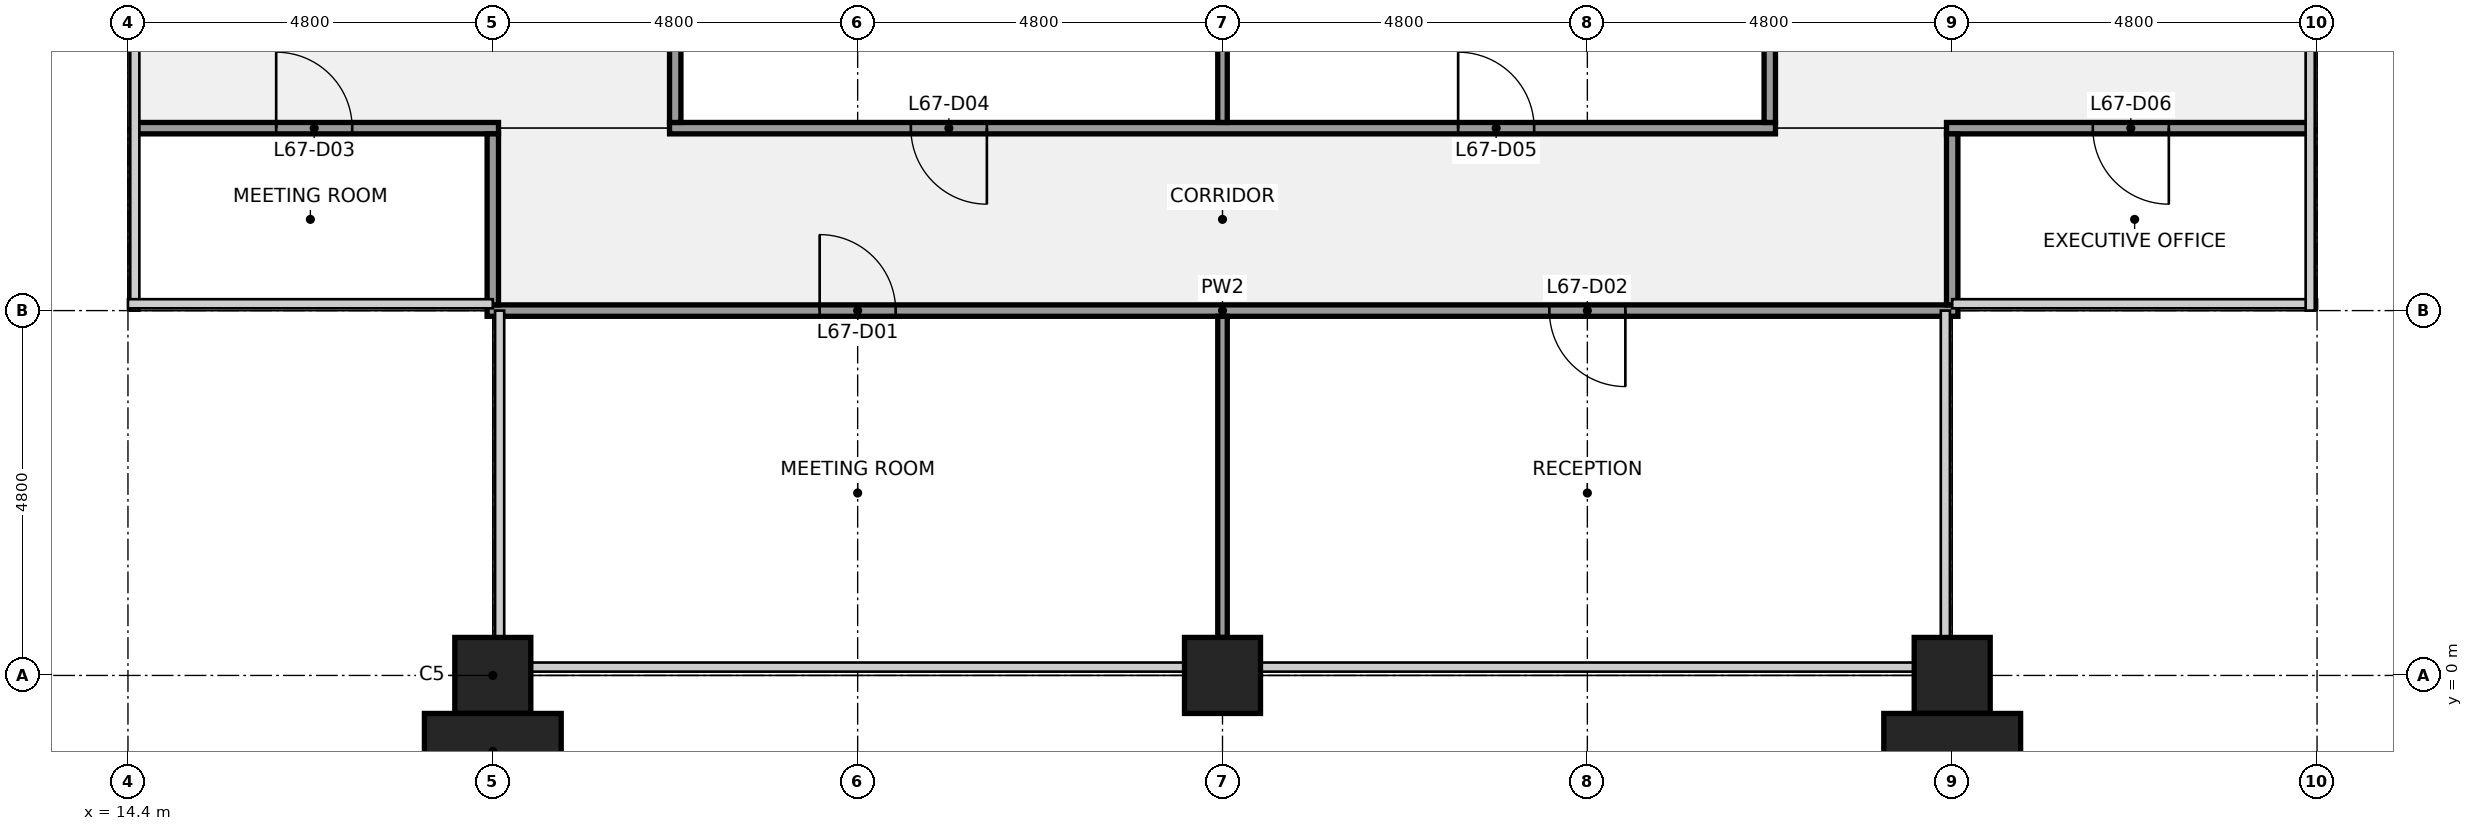
"""IFC4 building model, lengths in metres.
Left out: names, types, materials, properties, quantities, classifications, styles, units other than length and angle.
Written with IfcOpenShell. Run it as: python <this file> out.ifc"""

import sys

from ifc_helpers import new_model, si_unit, direction, frame, frame_2d, origin, origin_2d, place, context, subcontext, project, spatial, rectangle, extrude, element, fill, save


model = new_model("IFC4")
c1 = context("Model", 3, precision=1e-05, world=origin(), true_north=direction((0.0, 1.0)))
c2 = subcontext(c1, "Body", "Model", "MODEL_VIEW")
j1 = project(units=[si_unit("LENGTHUNIT", "METRE"), si_unit("PLANEANGLEUNIT", "RADIAN")], contexts=[c1])
p1 = place(None, origin())
s1 = spatial("IfcSite", under=j1, at=p1, CompositionType="ELEMENT")
p2 = place(p1, origin())
s2 = spatial("IfcBuilding", under=s1, at=p2, CompositionType="ELEMENT")
p3 = place(p2, frame((0.0, 0.0, 306.3)))
s3 = spatial("IfcBuildingStorey", under=s2, at=p3, CompositionType="ELEMENT", Elevation=306.3)
for number, where, z_axis, x_axis in (
    (1, (19.2, 0.0, 0.0), (0.0, 0.0, 1.0), (1.0, 0.0, 0.0)),
    (2, (28.8, 0.0, 0.0), (0.0, 0.0, 1.0), (1.0, 0.0, 0.0)),
    (3, (38.4, 0.0, 0.0), (0.0, 0.0, 1.0), (1.0, 0.0, 0.0)),
):
    element("IfcColumn", number, at=place(p3, frame(where, z_axis=z_axis, x_axis=x_axis)), inside=s3, PredefinedType="COLUMN", context=c2, shape_type="SweptSolid", body=[
        extrude(rectangle(XDim=1.0, YDim=1.0, at=origin_2d()), origin(), (0.0, 0.0, 1.0), 4.0),
    ])
p4 = place(p3, frame((19.125, 4.8, 0.0), z_axis=(0.0, 0.0, 1.0), x_axis=(1.0, 0.0, 0.0)))
e4 = element("IfcWall", 4, at=p4, inside=s3, PredefinedType="PARTITIONING", context=c2, shape_type="SweptSolid", body=[
    extrude(rectangle(XDim=19.35, YDim=0.15, at=frame_2d((9.675, 0.0))), origin(), (0.0, 0.0, 1.0), 2.87),
])
p5 = place(p4, frame((4.375, 0.0, 0.0)))
e5 = element("IfcOpeningElement", 5, at=p5, cuts=e4, PredefinedType="OPENING", context=c2, shape_type="SweptSolid", body=[
    extrude(rectangle(XDim=1.0, YDim=2.1, at=frame_2d((0.5, 1.05))), frame((0.0, 0.085, 0.0), z_axis=(0.0, -1.0, 0.0), x_axis=(1.0, 0.0, 0.0)), (0.0, 0.0, 1.0), 0.17),
])
p6 = place(p4, frame((13.975, 0.0, 0.0)))
e6 = element("IfcOpeningElement", 6, at=p6, cuts=e4, PredefinedType="OPENING", context=c2, shape_type="SweptSolid", body=[
    extrude(rectangle(XDim=1.0, YDim=2.1, at=frame_2d((0.5, 1.05))), frame((0.0, 0.085, 0.0), z_axis=(0.0, -1.0, 0.0), x_axis=(1.0, 0.0, 0.0)), (0.0, 0.0, 1.0), 0.17),
])
p7 = place(p3, frame((14.5, 7.2, 0.0), z_axis=(0.0, 0.0, 1.0), x_axis=(1.0, 0.0, 0.0)))
e7 = element("IfcWall", 7, at=p7, inside=s3, PredefinedType="PARTITIONING", context=c2, shape_type="SweptSolid", body=[
    extrude(rectangle(XDim=4.775, YDim=0.15, at=frame_2d((2.387, 0.0))), origin(), (0.0, 0.0, 1.0), 2.87),
])
p8 = place(p7, frame((1.85, 0.0, 0.0)))
e8 = element("IfcOpeningElement", 8, at=p8, cuts=e7, PredefinedType="OPENING", context=c2, shape_type="SweptSolid", body=[
    extrude(rectangle(XDim=1.0, YDim=2.1, at=frame_2d((0.5, 1.05))), frame((0.0, 0.085, 0.0), z_axis=(0.0, -1.0, 0.0), x_axis=(1.0, 0.0, 0.0)), (0.0, 0.0, 1.0), 0.17),
])
p9 = place(p3, frame((21.525, 7.2, 0.0), z_axis=(0.0, 0.0, 1.0), x_axis=(1.0, 0.0, 0.0)))
e9 = element("IfcWall", 9, at=p9, inside=s3, PredefinedType="PARTITIONING", context=c2, shape_type="SweptSolid", body=[
    extrude(rectangle(XDim=14.55, YDim=0.15, at=frame_2d((7.275, 0.0))), origin(), (0.0, 0.0, 1.0), 2.87),
])
p10 = place(p9, frame((3.175, 0.0, 0.0)))
e10 = element("IfcOpeningElement", 10, at=p10, cuts=e9, PredefinedType="OPENING", context=c2, shape_type="SweptSolid", body=[
    extrude(rectangle(XDim=1.0, YDim=2.1, at=frame_2d((0.5, 1.05))), frame((0.0, 0.085, 0.0), z_axis=(0.0, -1.0, 0.0), x_axis=(1.0, 0.0, 0.0)), (0.0, 0.0, 1.0), 0.17),
])
p11 = place(p9, frame((10.375, 0.0, 0.0)))
e11 = element("IfcOpeningElement", 11, at=p11, cuts=e9, PredefinedType="OPENING", context=c2, shape_type="SweptSolid", body=[
    extrude(rectangle(XDim=1.0, YDim=2.1, at=frame_2d((0.5, 1.05))), frame((0.0, 0.085, 0.0), z_axis=(0.0, -1.0, 0.0), x_axis=(1.0, 0.0, 0.0)), (0.0, 0.0, 1.0), 0.17),
])
p12 = place(p3, frame((38.325, 7.2, 0.0), z_axis=(0.0, 0.0, 1.0), x_axis=(1.0, 0.0, 0.0)))
e12 = element("IfcWall", 12, at=p12, inside=s3, PredefinedType="PARTITIONING", context=c2, shape_type="SweptSolid", body=[
    extrude(rectangle(XDim=4.775, YDim=0.15, at=frame_2d((2.388, 0.0))), origin(), (0.0, 0.0, 1.0), 2.87),
])
p13 = place(p12, frame((1.925, 0.0, 0.0)))
e13 = element("IfcOpeningElement", 13, at=p13, cuts=e12, PredefinedType="OPENING", context=c2, shape_type="SweptSolid", body=[
    extrude(rectangle(XDim=1.0, YDim=2.1, at=frame_2d((0.5, 1.05))), frame((0.0, 0.085, 0.0), z_axis=(0.0, -1.0, 0.0), x_axis=(1.0, 0.0, 0.0)), (0.0, 0.0, 1.0), 0.17),
])
p14 = place(p3, frame((19.2, 4.875, 0.0), z_axis=(0.0, 0.0, 1.0), x_axis=(0.0, 1.0, 0.0)))
e14 = element("IfcWall", 14, at=p14, inside=s3, PredefinedType="PARTITIONING", context=c2, shape_type="SweptSolid", body=[
    extrude(rectangle(XDim=2.25, YDim=0.15, at=frame_2d((1.125, 0.0))), origin(), (0.0, 0.0, 1.0), 2.87),
])
p15 = place(p3, frame((21.6, 7.275, 0.0), z_axis=(0.0, 0.0, 1.0), x_axis=(0.0, 1.0, 0.0)))
e15 = element("IfcWall", 15, at=p15, inside=s3, PredefinedType="PARTITIONING", context=c2, shape_type="SweptSolid", body=[
    extrude(rectangle(XDim=3.463, YDim=0.15, at=frame_2d((1.731, 0.0))), origin(), (0.0, 0.0, 1.0), 2.87),
])
p16 = place(p3, frame((28.8, 0.5, 0.0), z_axis=(0.0, 0.0, 1.0), x_axis=(0.0, 1.0, 0.0)))
e16 = element("IfcWall", 16, at=p16, inside=s3, PredefinedType="PARTITIONING", context=c2, shape_type="SweptSolid", body=[
    extrude(rectangle(XDim=4.225, YDim=0.125, at=frame_2d((2.113, 0.0))), origin(), (0.0, 0.0, 1.0), 2.87),
])
p17 = place(p3, frame((28.8, 7.275, 0.0), z_axis=(0.0, 0.0, 1.0), x_axis=(0.0, 1.0, 0.0)))
e17 = element("IfcWall", 17, at=p17, inside=s3, PredefinedType="PARTITIONING", context=c2, shape_type="SweptSolid", body=[
    extrude(rectangle(XDim=3.463, YDim=0.125, at=frame_2d((1.731, 0.0))), origin(), (0.0, 0.0, 1.0), 2.87),
])
p18 = place(p3, frame((36.0, 7.275, 0.0), z_axis=(0.0, 0.0, 1.0), x_axis=(0.0, 1.0, 0.0)))
e18 = element("IfcWall", 18, at=p18, inside=s3, PredefinedType="PARTITIONING", context=c2, shape_type="SweptSolid", body=[
    extrude(rectangle(XDim=3.463, YDim=0.15, at=frame_2d((1.731, 0.0))), origin(), (0.0, 0.0, 1.0), 2.87),
])
p19 = place(p3, frame((38.4, 4.875, 0.0), z_axis=(0.0, 0.0, 1.0), x_axis=(0.0, 1.0, 0.0)))
e19 = element("IfcWall", 19, at=p19, inside=s3, PredefinedType="PARTITIONING", context=c2, shape_type="SweptSolid", body=[
    extrude(rectangle(XDim=2.25, YDim=0.15, at=frame_2d((1.125, 0.0))), origin(), (0.0, 0.0, 1.0), 2.87),
])
for number, where, z_axis, x_axis in (
    (20, (19.2, -1.0, 0.0), (0.0, 0.0, 1.0), (1.0, 0.0, 0.0)),
    (21, (38.4, -1.0, 0.0), (0.0, 0.0, 1.0), (1.0, 0.0, 0.0)),
):
    element("IfcColumn", number, at=place(p3, frame(where, z_axis=z_axis, x_axis=x_axis)), inside=s3, PredefinedType="PILASTER", context=c2, shape_type="SweptSolid", body=[
        extrude(rectangle(XDim=1.8, YDim=1.0, at=origin_2d()), origin(), (0.0, 0.0, 1.0), 4.0),
    ])
p20 = place(p5, origin())
e22 = element("IfcDoor", 22, at=p20, inside=s3, OperationType="SINGLE_SWING_LEFT", PredefinedType="DOOR", context=c2, shape_type="SweptSolid", body=[
    extrude(rectangle(XDim=1.0, YDim=2.1, at=frame_2d((0.5, 1.05))), frame((0.0, 0.025, 0.0), z_axis=(0.0, -1.0, 0.0), x_axis=(1.0, 0.0, 0.0)), (0.0, 0.0, 1.0), 0.05),
])
fill(e5, e22)
p21 = place(p6, origin())
e23 = element("IfcDoor", 23, at=p21, inside=s3, OperationType="SINGLE_SWING_RIGHT", PredefinedType="DOOR", context=c2, shape_type="SweptSolid", body=[
    extrude(rectangle(XDim=1.0, YDim=2.1, at=frame_2d((0.5, 1.05))), frame((0.0, 0.025, 0.0), z_axis=(0.0, -1.0, 0.0), x_axis=(1.0, 0.0, 0.0)), (0.0, 0.0, 1.0), 0.05),
])
fill(e6, e23)
p22 = place(p8, origin())
e24 = element("IfcDoor", 24, at=p22, inside=s3, OperationType="SINGLE_SWING_LEFT", PredefinedType="DOOR", context=c2, shape_type="SweptSolid", body=[
    extrude(rectangle(XDim=1.0, YDim=2.1, at=frame_2d((0.5, 1.05))), frame((0.0, 0.025, 0.0), z_axis=(0.0, -1.0, 0.0), x_axis=(1.0, 0.0, 0.0)), (0.0, 0.0, 1.0), 0.05),
])
fill(e8, e24)
p23 = place(p10, origin())
e25 = element("IfcDoor", 25, at=p23, inside=s3, OperationType="SINGLE_SWING_RIGHT", PredefinedType="DOOR", context=c2, shape_type="SweptSolid", body=[
    extrude(rectangle(XDim=1.0, YDim=2.1, at=frame_2d((0.5, 1.05))), frame((0.0, 0.025, 0.0), z_axis=(0.0, -1.0, 0.0), x_axis=(1.0, 0.0, 0.0)), (0.0, 0.0, 1.0), 0.05),
])
fill(e10, e25)
p24 = place(p11, origin())
e26 = element("IfcDoor", 26, at=p24, inside=s3, OperationType="SINGLE_SWING_LEFT", PredefinedType="DOOR", context=c2, shape_type="SweptSolid", body=[
    extrude(rectangle(XDim=1.0, YDim=2.1, at=frame_2d((0.5, 1.05))), frame((0.0, 0.025, 0.0), z_axis=(0.0, -1.0, 0.0), x_axis=(1.0, 0.0, 0.0)), (0.0, 0.0, 1.0), 0.05),
])
fill(e11, e26)
p25 = place(p13, origin())
e27 = element("IfcDoor", 27, at=p25, inside=s3, OperationType="SINGLE_SWING_RIGHT", PredefinedType="DOOR", context=c2, shape_type="SweptSolid", body=[
    extrude(rectangle(XDim=1.0, YDim=2.1, at=frame_2d((0.5, 1.05))), frame((0.0, 0.025, 0.0), z_axis=(0.0, -1.0, 0.0), x_axis=(1.0, 0.0, 0.0)), (0.0, 0.0, 1.0), 0.05),
])
fill(e13, e27)
save(model, sys.argv[1])
